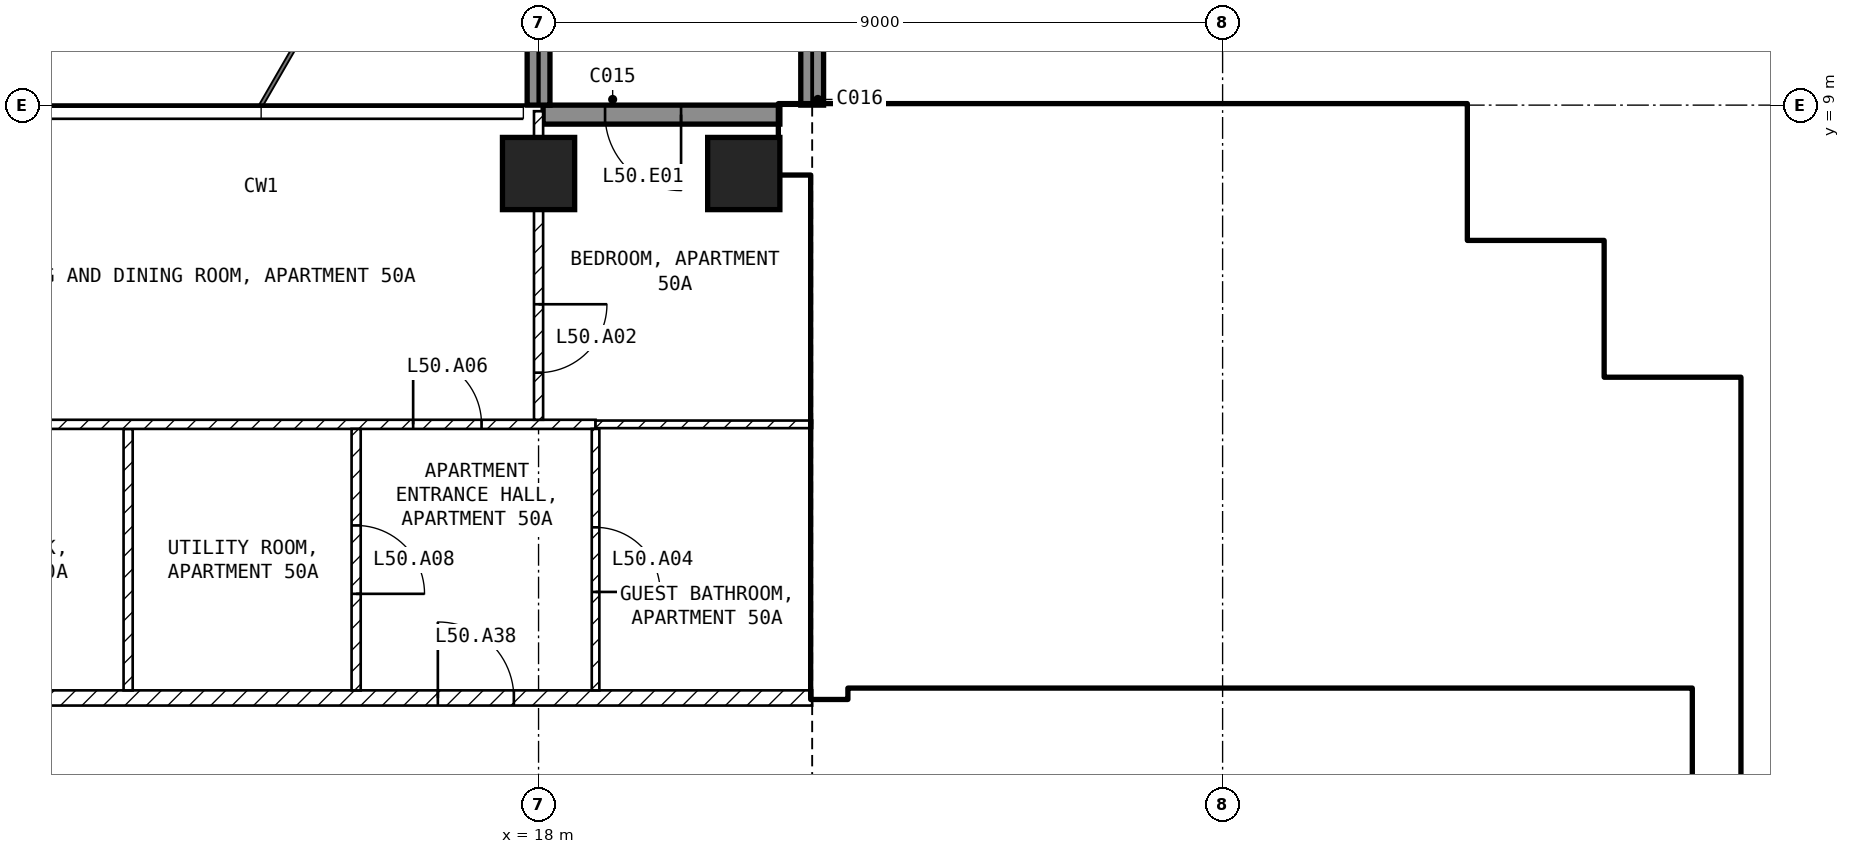
"""IFC4 building model, lengths in metres.
Left out: names, types, materials, properties, quantities, classifications, styles, units other than length and angle.
Written with IfcOpenShell. Run it as: python <this file> out.ifc"""

import sys

from ifc_helpers import new_model, si_unit, direction, frame, frame_2d, origin, origin_2d, place, context, subcontext, project, spatial, rectangle, extrude, element, fill, save


model = new_model("IFC4")
c1 = context("Model", 3, precision=1e-05, world=origin(), true_north=direction((0.0, 1.0)))
c2 = subcontext(c1, "Body", "Model", "MODEL_VIEW")
j1 = project(units=[si_unit("LENGTHUNIT", "METRE"), si_unit("PLANEANGLEUNIT", "RADIAN")], contexts=[c1])
p1 = place(None, origin())
s1 = spatial("IfcSite", under=j1, at=p1, CompositionType="ELEMENT")
p2 = place(p1, origin())
s2 = spatial("IfcBuilding", under=s1, at=p2, CompositionType="ELEMENT")
p3 = place(p2, frame((0.0, 0.0, 201.6)))
s3 = spatial("IfcBuildingStorey", under=s2, at=p3, CompositionType="ELEMENT", Elevation=201.6)
for number, where, z_axis, x_axis in (
    (1, (18.0, 8.1, -0.25), (0.0, 0.0, 1.0), (1.0, 0.0, 0.0)),
    (2, (20.7, 8.1, -0.25), (0.0, 0.0, 1.0), (1.0, 0.0, 0.0)),
):
    element("IfcColumn", number, at=place(p3, frame(where, z_axis=z_axis, x_axis=x_axis)), inside=s3, PredefinedType="COLUMN", context=c2, shape_type="SweptSolid", body=[
        extrude(rectangle(XDim=0.95, YDim=0.95, at=origin_2d()), origin(), (0.0, 0.0, 1.0), 3.5),
    ])
p4 = place(p3, frame((21.175, 8.875, 0.0), z_axis=(0.0, 0.0, 1.0), x_axis=(-1.0, 0.0, 0.0)))
e3 = element("IfcWall", 3, at=p4, inside=s3, PredefinedType="SOLIDWALL", context=c2, shape_type="SweptSolid", body=[
    extrude(rectangle(XDim=3.115, YDim=0.25, at=frame_2d((1.558, 0.0))), origin(), (0.0, 0.0, 1.0), 3.25),
])
p5 = place(p4, frame((1.3, 0.0, 0.0)))
e4 = element("IfcOpeningElement", 4, at=p5, cuts=e3, PredefinedType="OPENING", context=c2, shape_type="SweptSolid", body=[
    extrude(rectangle(XDim=1.0, YDim=2.4, at=frame_2d((0.5, 1.2))), frame((0.0, 0.135, 0.0), z_axis=(0.0, -1.0, 0.0), x_axis=(1.0, 0.0, 0.0)), (0.0, 0.0, 1.0), 0.27),
])
for number, where, z_axis, x_axis in (
    (5, (18.0, 9.0, 0.0), (0.0, 0.0, 1.0), (0.0, 1.0, 0.0)),
    (6, (21.6, 9.0, 0.0), (0.0, 0.0, 1.0), (0.0, 1.0, 0.0)),
):
    element("IfcWall", number, at=place(p3, frame(where, z_axis=z_axis, x_axis=x_axis)), inside=s3, PredefinedType="SOLIDWALL", context=c2, shape_type="SweptSolid", body=[
        extrude(rectangle(XDim=2.7, YDim=0.3, at=frame_2d((1.35, 0.0))), origin(), (0.0, 0.0, 1.0), 3.25),
    ])
p6 = place(p3, frame((33.5, -4.8, 0.0), z_axis=(0.0, 0.0, 1.0), x_axis=(0.0, 1.0, 0.0)))
e7 = element("IfcWall", 7, at=p6, inside=s3, PredefinedType="SHEAR", context=c2, shape_type="SweptSolid", body=[
    extrude(rectangle(XDim=10.2, YDim=0.6, at=frame_2d((5.1, 0.0))), origin(), (0.0, 0.0, 1.0), 3.25),
])
for number, where, z_axis, x_axis in (
    (8, (31.4, 5.1, 0.0), (0.0, 0.0, 1.0), (1.0, 0.0, 0.0)),
    (9, (31.7, 5.4, 0.0), (0.0, 0.0, 1.0), (0.0, 1.0, 0.0)),
):
    element("IfcWall", number, at=place(p3, frame(where, z_axis=z_axis, x_axis=x_axis)), inside=s3, PredefinedType="SHEAR", context=c2, shape_type="SweptSolid", body=[
        extrude(rectangle(XDim=1.8, YDim=0.6, at=frame_2d((0.9, 0.0))), origin(), (0.0, 0.0, 1.0), 3.25),
    ])
p7 = place(p3, frame((29.6, 6.9, 0.0), z_axis=(0.0, 0.0, 1.0), x_axis=(1.0, 0.0, 0.0)))
e10 = element("IfcWall", 10, at=p7, inside=s3, PredefinedType="SHEAR", context=c2, shape_type="SweptSolid", body=[
    extrude(rectangle(XDim=1.8, YDim=0.6, at=frame_2d((0.9, 0.0))), origin(), (0.0, 0.0, 1.0), 3.25),
])
p8 = place(p3, frame((29.9, 7.2, 0.0), z_axis=(0.0, 0.0, 1.0), x_axis=(0.0, 1.0, 0.0)))
e11 = element("IfcWall", 11, at=p8, inside=s3, PredefinedType="SHEAR", context=c2, shape_type="SweptSolid", body=[
    extrude(rectangle(XDim=1.8, YDim=0.6, at=frame_2d((0.9, 0.0))), origin(), (0.0, 0.0, 1.0), 3.25),
])
p9 = place(p3, frame((21.175, 8.55, 0.0), z_axis=(0.0, 0.0, 1.0), x_axis=(1.0, 0.0, 0.0)))
e12 = element("IfcWall", 12, at=p9, inside=s3, PredefinedType="SHEAR", context=c2, shape_type="SweptSolid", body=[
    extrude(rectangle(XDim=8.425, YDim=0.9, at=frame_2d((4.212, 0.0))), origin(), (0.0, 0.0, 1.0), 3.25),
])
p10 = place(p3, frame((21.825, 1.2, 0.0), z_axis=(0.0, 0.0, 1.0), x_axis=(0.0, 1.0, 0.0)))
e13 = element("IfcWall", 13, at=p10, inside=s3, PredefinedType="SHEAR", context=c2, shape_type="SweptSolid", body=[
    extrude(rectangle(XDim=6.9, YDim=0.45, at=frame_2d((3.45, 0.0))), origin(), (0.0, 0.0, 1.0), 3.25),
])
p11 = place(p3, frame((22.05, 1.45, 0.0), z_axis=(0.0, 0.0, 1.0), x_axis=(1.0, 0.0, 0.0)))
e14 = element("IfcWall", 14, at=p11, inside=s3, PredefinedType="SOLIDWALL", context=c2, shape_type="SweptSolid", body=[
    extrude(rectangle(XDim=11.15, YDim=0.2, at=frame_2d((5.575, 0.0))), origin(), (0.0, 0.0, 1.0), 3.25),
])
p12 = place(p11, frame((0.75, 0.0, 0.0)))
e15 = element("IfcOpeningElement", 15, at=p12, cuts=e14, PredefinedType="OPENING", context=c2, shape_type="SweptSolid", body=[
    extrude(rectangle(XDim=1.0, YDim=2.1, at=frame_2d((0.5, 1.05))), frame((0.0, 0.11, 0.0), z_axis=(0.0, -1.0, 0.0), x_axis=(1.0, 0.0, 0.0)), (0.0, 0.0, 1.0), 0.22),
])
p13 = place(p11, frame((3.25, 0.0, 0.0)))
e16 = element("IfcOpeningElement", 16, at=p13, cuts=e14, PredefinedType="OPENING", context=c2, shape_type="SweptSolid", body=[
    extrude(rectangle(XDim=1.0, YDim=2.1, at=frame_2d((0.5, 1.05))), frame((0.0, 0.11, 0.0), z_axis=(0.0, -1.0, 0.0), x_axis=(1.0, 0.0, 0.0)), (0.0, 0.0, 1.0), 0.22),
])
p14 = place(p11, frame((9.15, 0.0, 0.0)))
e17 = element("IfcOpeningElement", 17, at=p14, cuts=e14, PredefinedType="OPENING", context=c2, shape_type="SweptSolid", body=[
    extrude(rectangle(XDim=0.9, YDim=2.1, at=frame_2d((0.45, 1.05))), frame((0.0, 0.11, 0.0), z_axis=(0.0, -1.0, 0.0), x_axis=(1.0, 0.0, 0.0)), (0.0, 0.0, 1.0), 0.22),
])
p15 = place(p3, frame((22.05, 5.15, 0.0), z_axis=(0.0, 0.0, 1.0), x_axis=(1.0, 0.0, 0.0)))
e18 = element("IfcWall", 18, at=p15, inside=s3, PredefinedType="SOLIDWALL", context=c2, shape_type="SweptSolid", body=[
    extrude(rectangle(XDim=6.3, YDim=0.2, at=frame_2d((3.15, 0.0))), origin(), (0.0, 0.0, 1.0), 3.25),
])
p16 = place(p15, frame((0.2, 0.0, 0.0)))
e19 = element("IfcOpeningElement", 19, at=p16, cuts=e18, PredefinedType="OPENING", context=c2, shape_type="SweptSolid", body=[
    extrude(rectangle(XDim=1.0, YDim=2.1, at=frame_2d((0.5, 1.05))), frame((0.0, 0.11, 0.0), z_axis=(0.0, -1.0, 0.0), x_axis=(1.0, 0.0, 0.0)), (0.0, 0.0, 1.0), 0.22),
])
p17 = place(p3, frame((28.25, 5.25, 0.0), z_axis=(0.0, 0.0, 1.0), x_axis=(0.0, 1.0, 0.0)))
e20 = element("IfcWall", 20, at=p17, inside=s3, PredefinedType="SOLIDWALL", context=c2, shape_type="SweptSolid", body=[
    extrude(rectangle(XDim=2.85, YDim=0.2, at=frame_2d((1.425, 0.0))), origin(), (0.0, 0.0, 1.0), 3.25),
])
p18 = place(p3, frame((27.2, 3.95, 0.0), z_axis=(0.0, 0.0, 1.0), x_axis=(1.0, 0.0, 0.0)))
e21 = element("IfcWall", 21, at=p18, inside=s3, PredefinedType="SOLIDWALL", context=c2, shape_type="SweptSolid", body=[
    extrude(rectangle(XDim=6.0, YDim=0.2, at=frame_2d((3.0, 0.0))), origin(), (0.0, 0.0, 1.0), 3.25),
])
p19 = place(p3, frame((27.1, 1.55, 0.0), z_axis=(0.0, 0.0, 1.0), x_axis=(0.0, 1.0, 0.0)))
e22 = element("IfcWall", 22, at=p19, inside=s3, PredefinedType="SOLIDWALL", context=c2, shape_type="SweptSolid", body=[
    extrude(rectangle(XDim=3.5, YDim=0.2, at=frame_2d((1.75, 0.0))), origin(), (0.0, 0.0, 1.0), 3.25),
])
p20 = place(p19, frame((0.6, 0.0, 0.0)))
e23 = element("IfcOpeningElement", 23, at=p20, cuts=e22, PredefinedType="OPENING", context=c2, shape_type="SweptSolid", body=[
    extrude(rectangle(XDim=1.1, YDim=2.1, at=frame_2d((0.55, 1.05))), frame((0.0, 0.11, 0.0), z_axis=(0.0, -1.0, 0.0), x_axis=(1.0, 0.0, 0.0)), (0.0, 0.0, 1.0), 0.22),
])
p21 = place(p19, frame((2.6, 0.0, 0.0)))
e24 = element("IfcOpeningElement", 24, at=p21, cuts=e22, PredefinedType="OPENING", context=c2, shape_type="SweptSolid", body=[
    extrude(rectangle(XDim=0.8, YDim=2.1, at=frame_2d((0.4, 1.05))), frame((0.0, 0.11, 0.0), z_axis=(0.0, -1.0, 0.0), x_axis=(1.0, 0.0, 0.0)), (0.0, 0.0, 1.0), 0.22),
])
p22 = place(p3, frame((30.0, 1.55, 0.0), z_axis=(0.0, 0.0, 1.0), x_axis=(0.0, 1.0, 0.0)))
e25 = element("IfcWall", 25, at=p22, inside=s3, PredefinedType="SOLIDWALL", context=c2, shape_type="SweptSolid", body=[
    extrude(rectangle(XDim=2.3, YDim=0.2, at=frame_2d((1.15, 0.0))), origin(), (0.0, 0.0, 1.0), 3.25),
])
p23 = place(p3, frame((4.4, 1.2, 0.0), z_axis=(0.0, 0.0, 1.0), x_axis=(1.0, 0.0, 0.0)))
e26 = element("IfcWall", 26, at=p23, inside=s3, PredefinedType="PARTITIONING", context=c2, shape_type="SweptSolid", body=[
    extrude(rectangle(XDim=17.2, YDim=0.2, at=frame_2d((8.6, 0.0))), origin(), (0.0, 0.0, 1.0), 3.25),
])
p24 = place(p23, frame((12.275, 0.0, 0.0)))
e27 = element("IfcOpeningElement", 27, at=p24, cuts=e26, PredefinedType="OPENING", context=c2, shape_type="SweptSolid", body=[
    extrude(rectangle(XDim=1.0, YDim=2.1, at=frame_2d((0.5, 1.05))), frame((0.0, 0.11, 0.0), z_axis=(0.0, -1.0, 0.0), x_axis=(1.0, 0.0, 0.0)), (0.0, 0.0, 1.0), 0.22),
])
p25 = place(p3, frame((12.6, 4.74, 0.0), z_axis=(0.0, 0.0, 1.0), x_axis=(0.0, -1.0, 0.0)))
e28 = element("IfcWall", 28, at=p25, inside=s3, PredefinedType="PARTITIONING", context=c2, shape_type="SweptSolid", body=[
    extrude(rectangle(XDim=3.44, YDim=0.12, at=frame_2d((1.72, 0.0))), origin(), (0.0, 0.0, 1.0), 3.25),
])
p26 = place(p3, frame((8.94, 4.8, 0.0), z_axis=(0.0, 0.0, 1.0), x_axis=(1.0, 0.0, 0.0)))
e29 = element("IfcWall", 29, at=p26, inside=s3, PredefinedType="PARTITIONING", context=c2, shape_type="SweptSolid", body=[
    extrude(rectangle(XDim=9.81, YDim=0.12, at=frame_2d((4.905, 0.0))), origin(), (0.0, 0.0, 1.0), 3.25),
])
p27 = place(p26, frame((1.41, 0.0, 0.0)))
e30 = element("IfcOpeningElement", 30, at=p27, cuts=e29, PredefinedType="OPENING", context=c2, shape_type="SweptSolid", body=[
    extrude(rectangle(XDim=0.9, YDim=2.1, at=frame_2d((0.45, 1.05))), frame((0.0, 0.07, 0.0), z_axis=(0.0, -1.0, 0.0), x_axis=(1.0, 0.0, 0.0)), (0.0, 0.0, 1.0), 0.14),
])
p28 = place(p26, frame((7.41, 0.0, 0.0)))
e31 = element("IfcOpeningElement", 31, at=p28, cuts=e29, PredefinedType="OPENING", context=c2, shape_type="SweptSolid", body=[
    extrude(rectangle(XDim=0.9, YDim=2.1, at=frame_2d((0.45, 1.05))), frame((0.0, 0.07, 0.0), z_axis=(0.0, -1.0, 0.0), x_axis=(1.0, 0.0, 0.0)), (0.0, 0.0, 1.0), 0.14),
])
p29 = place(p3, frame((15.6, 4.74, 0.0), z_axis=(0.0, 0.0, 1.0), x_axis=(0.0, -1.0, 0.0)))
e32 = element("IfcWall", 32, at=p29, inside=s3, PredefinedType="PARTITIONING", context=c2, shape_type="SweptSolid", body=[
    extrude(rectangle(XDim=3.44, YDim=0.12, at=frame_2d((1.72, 0.0))), origin(), (0.0, 0.0, 1.0), 3.25),
])
p30 = place(p29, frame((1.27, 0.0, 0.0)))
e33 = element("IfcOpeningElement", 33, at=p30, cuts=e32, PredefinedType="OPENING", context=c2, shape_type="SweptSolid", body=[
    extrude(rectangle(XDim=0.9, YDim=2.1, at=frame_2d((0.45, 1.05))), frame((0.0, 0.07, 0.0), z_axis=(0.0, -1.0, 0.0), x_axis=(1.0, 0.0, 0.0)), (0.0, 0.0, 1.0), 0.14),
])
p31 = place(p3, frame((18.75, 4.74, 0.0), z_axis=(0.0, 0.0, 1.0), x_axis=(0.0, -1.0, 0.0)))
e34 = element("IfcWall", 34, at=p31, inside=s3, PredefinedType="PARTITIONING", context=c2, shape_type="SweptSolid", body=[
    extrude(rectangle(XDim=3.44, YDim=0.1, at=frame_2d((1.72, 0.0))), origin(), (0.0, 0.0, 1.0), 3.25),
])
p32 = place(p31, frame((1.295, 0.0, 0.0)))
e35 = element("IfcOpeningElement", 35, at=p32, cuts=e34, PredefinedType="OPENING", context=c2, shape_type="SweptSolid", body=[
    extrude(rectangle(XDim=0.85, YDim=2.1, at=frame_2d((0.425, 1.05))), frame((0.0, 0.06, 0.0), z_axis=(0.0, -1.0, 0.0), x_axis=(1.0, 0.0, 0.0)), (0.0, 0.0, 1.0), 0.12),
])
p33 = place(p3, frame((18.75, 4.8, 0.0), z_axis=(0.0, 0.0, 1.0), x_axis=(1.0, 0.0, 0.0)))
e36 = element("IfcWall", 36, at=p33, inside=s3, PredefinedType="PARTITIONING", context=c2, shape_type="SweptSolid", body=[
    extrude(rectangle(XDim=2.85, YDim=0.1, at=frame_2d((1.425, 0.0))), origin(), (0.0, 0.0, 1.0), 3.25),
])
p34 = place(p3, frame((18.0, 8.92, 0.0), z_axis=(0.0, 0.0, 1.0), x_axis=(0.0, -1.0, 0.0)))
e37 = element("IfcWall", 37, at=p34, inside=s3, PredefinedType="PARTITIONING", context=c2, shape_type="SweptSolid", body=[
    extrude(rectangle(XDim=4.06, YDim=0.12, at=frame_2d((2.03, 0.0))), origin(), (0.0, 0.0, 1.0), 2.48),
])
p35 = place(p34, frame((2.54, 0.0, 0.0)))
e38 = element("IfcOpeningElement", 38, at=p35, cuts=e37, PredefinedType="OPENING", context=c2, shape_type="SweptSolid", body=[
    extrude(rectangle(XDim=0.9, YDim=2.1, at=frame_2d((0.45, 1.05))), frame((0.0, 0.07, 0.0), z_axis=(0.0, -1.0, 0.0), x_axis=(1.0, 0.0, 0.0)), (0.0, 0.0, 1.0), 0.14),
])
p36 = place(p5, origin())
e39 = element("IfcDoor", 39, at=p36, inside=s3, OperationType="SINGLE_SWING_LEFT", PredefinedType="DOOR", context=c2, shape_type="SweptSolid", body=[
    extrude(rectangle(XDim=1.0, YDim=2.4, at=frame_2d((0.5, 1.2))), frame((0.0, 0.025, 0.0), z_axis=(0.0, -1.0, 0.0), x_axis=(1.0, 0.0, 0.0)), (0.0, 0.0, 1.0), 0.05),
])
fill(e4, e39)
p37 = place(p20, origin())
e40 = element("IfcDoor", 40, at=p37, inside=s3, OperationType="DOUBLE_DOOR_SLIDING", PredefinedType="DOOR", context=c2, shape_type="SweptSolid", body=[
    extrude(rectangle(XDim=1.1, YDim=2.1, at=frame_2d((0.55, 1.05))), frame((0.0, 0.025, 0.0), z_axis=(0.0, -1.0, 0.0), x_axis=(1.0, 0.0, 0.0)), (0.0, 0.0, 1.0), 0.05),
])
fill(e23, e40)
p38 = place(p16, origin())
e41 = element("IfcDoor", 41, at=p38, inside=s3, OperationType="SINGLE_SWING_LEFT", PredefinedType="DOOR", context=c2, shape_type="SweptSolid", body=[
    extrude(rectangle(XDim=1.0, YDim=2.1, at=frame_2d((0.5, 1.05))), frame((0.0, 0.025, 0.0), z_axis=(0.0, -1.0, 0.0), x_axis=(1.0, 0.0, 0.0)), (0.0, 0.0, 1.0), 0.05),
])
fill(e19, e41)
p39 = place(p12, origin())
e42 = element("IfcDoor", 42, at=p39, inside=s3, OperationType="SINGLE_SWING_LEFT", PredefinedType="DOOR", context=c2, shape_type="SweptSolid", body=[
    extrude(rectangle(XDim=1.0, YDim=2.1, at=frame_2d((0.5, 1.05))), frame((0.0, 0.025, 0.0), z_axis=(0.0, -1.0, 0.0), x_axis=(1.0, 0.0, 0.0)), (0.0, 0.0, 1.0), 0.05),
])
fill(e15, e42)
p40 = place(p13, origin())
e43 = element("IfcDoor", 43, at=p40, inside=s3, OperationType="SINGLE_SWING_LEFT", PredefinedType="DOOR", context=c2, shape_type="SweptSolid", body=[
    extrude(rectangle(XDim=1.0, YDim=2.1, at=frame_2d((0.5, 1.05))), frame((0.0, 0.025, 0.0), z_axis=(0.0, -1.0, 0.0), x_axis=(1.0, 0.0, 0.0)), (0.0, 0.0, 1.0), 0.05),
])
fill(e16, e43)
p41 = place(p21, origin())
e44 = element("IfcDoor", 44, at=p41, inside=s3, OperationType="SINGLE_SWING_LEFT", PredefinedType="DOOR", context=c2, shape_type="SweptSolid", body=[
    extrude(rectangle(XDim=0.8, YDim=2.1, at=frame_2d((0.4, 1.05))), frame((0.0, 0.025, 0.0), z_axis=(0.0, -1.0, 0.0), x_axis=(1.0, 0.0, 0.0)), (0.0, 0.0, 1.0), 0.05),
])
fill(e24, e44)
p42 = place(p14, origin())
e45 = element("IfcDoor", 45, at=p42, inside=s3, OperationType="SINGLE_SWING_LEFT", PredefinedType="DOOR", context=c2, shape_type="SweptSolid", body=[
    extrude(rectangle(XDim=0.9, YDim=2.1, at=frame_2d((0.45, 1.05))), frame((0.0, 0.025, 0.0), z_axis=(0.0, -1.0, 0.0), x_axis=(1.0, 0.0, 0.0)), (0.0, 0.0, 1.0), 0.05),
])
fill(e17, e45)
p43 = place(p35, origin())
e46 = element("IfcDoor", 46, at=p43, inside=s3, OperationType="SINGLE_SWING_LEFT", PredefinedType="DOOR", context=c2, shape_type="SweptSolid", body=[
    extrude(rectangle(XDim=0.9, YDim=2.1, at=frame_2d((0.45, 1.05))), frame((0.0, 0.025, 0.0), z_axis=(0.0, -1.0, 0.0), x_axis=(1.0, 0.0, 0.0)), (0.0, 0.0, 1.0), 0.05),
])
fill(e38, e46)
p44 = place(p32, origin())
e47 = element("IfcDoor", 47, at=p44, inside=s3, OperationType="SINGLE_SWING_RIGHT", PredefinedType="DOOR", context=c2, shape_type="SweptSolid", body=[
    extrude(rectangle(XDim=0.85, YDim=2.1, at=frame_2d((0.425, 1.05))), frame((0.0, 0.025, 0.0), z_axis=(0.0, -1.0, 0.0), x_axis=(1.0, 0.0, 0.0)), (0.0, 0.0, 1.0), 0.05),
])
fill(e35, e47)
p45 = place(p28, origin())
e48 = element("IfcDoor", 48, at=p45, inside=s3, OperationType="SINGLE_SWING_LEFT", PredefinedType="DOOR", context=c2, shape_type="SweptSolid", body=[
    extrude(rectangle(XDim=0.9, YDim=2.1, at=frame_2d((0.45, 1.05))), frame((0.0, 0.025, 0.0), z_axis=(0.0, -1.0, 0.0), x_axis=(1.0, 0.0, 0.0)), (0.0, 0.0, 1.0), 0.05),
])
fill(e31, e48)
p46 = place(p30, origin())
e49 = element("IfcDoor", 49, at=p46, inside=s3, OperationType="SINGLE_SWING_RIGHT", PredefinedType="DOOR", context=c2, shape_type="SweptSolid", body=[
    extrude(rectangle(XDim=0.9, YDim=2.1, at=frame_2d((0.45, 1.05))), frame((0.0, 0.025, 0.0), z_axis=(0.0, -1.0, 0.0), x_axis=(1.0, 0.0, 0.0)), (0.0, 0.0, 1.0), 0.05),
])
fill(e33, e49)
p47 = place(p24, origin())
e50 = element("IfcDoor", 50, at=p47, inside=s3, OperationType="SINGLE_SWING_LEFT", PredefinedType="DOOR", context=c2, shape_type="SweptSolid", body=[
    extrude(rectangle(XDim=1.0, YDim=2.1, at=frame_2d((0.5, 1.05))), frame((0.0, 0.025, 0.0), z_axis=(0.0, -1.0, 0.0), x_axis=(1.0, 0.0, 0.0)), (0.0, 0.0, 1.0), 0.05),
])
fill(e27, e50)
save(model, sys.argv[1])
